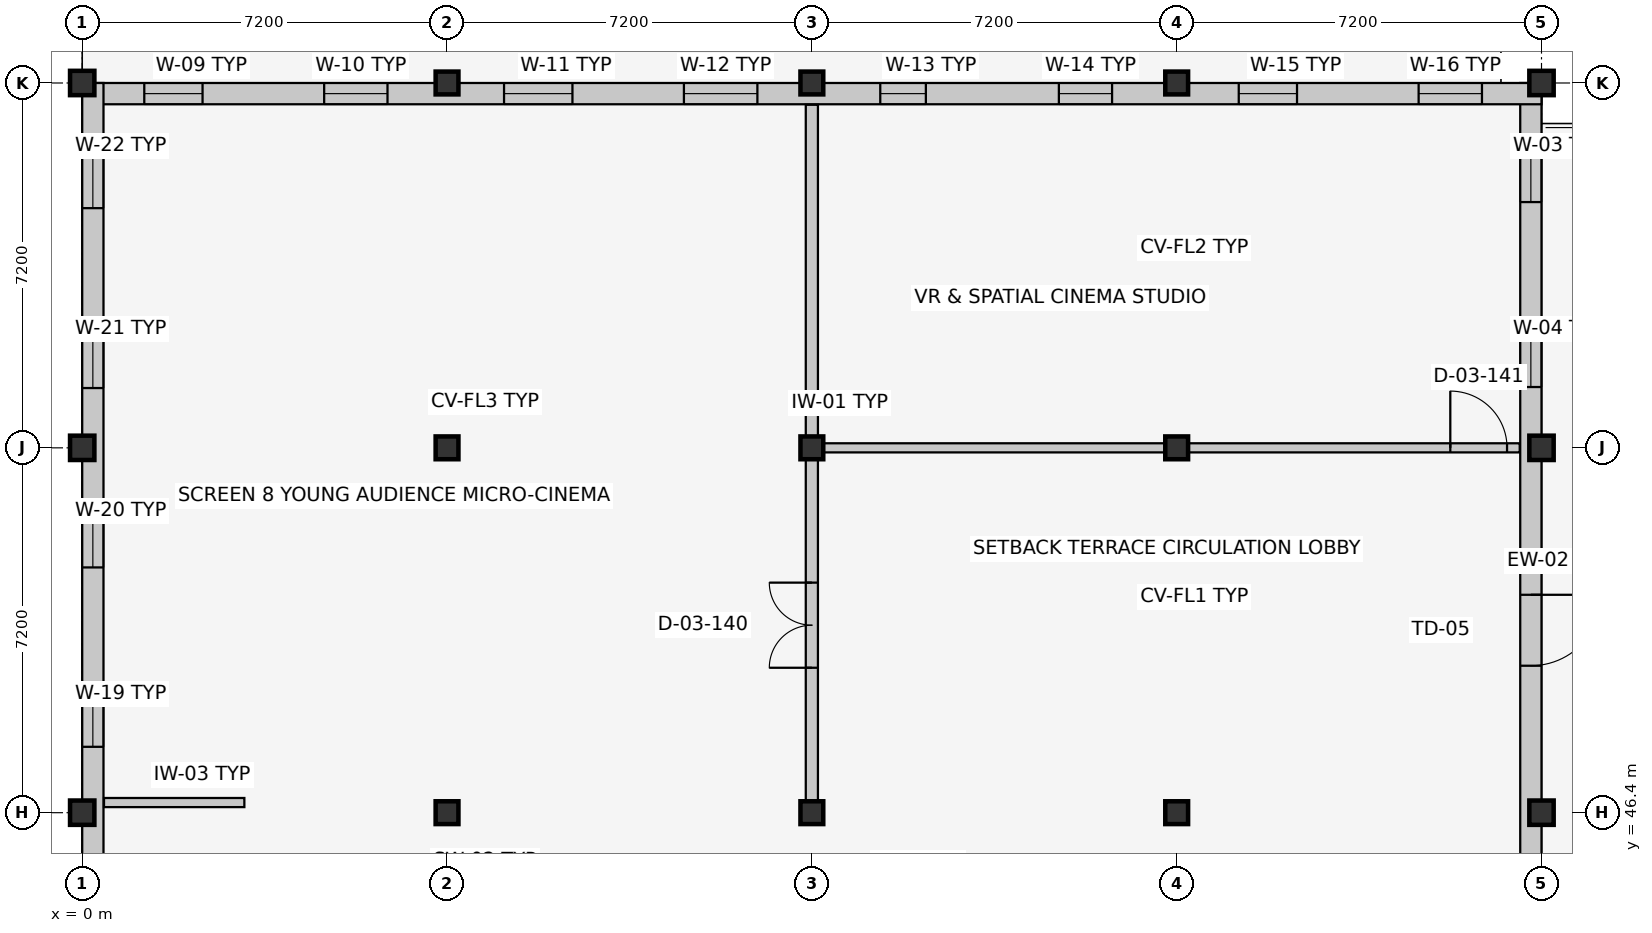
"""IFC4 building model, lengths in metres.
Left out: names, types, materials, properties, quantities, classifications, styles, units other than length and angle.
Written with IfcOpenShell. Run it as: python <this file> out.ifc"""

import sys

from ifc_helpers import new_model, si_unit, direction, frame, frame_2d, origin, origin_2d, place, context, subcontext, project, spatial, rectangle, extrude, element, fill, save


model = new_model("IFC4")
c1 = context("Model", 3, precision=1e-05, world=origin(), true_north=direction((0.0, 1.0)))
c2 = subcontext(c1, "Body", "Model", "MODEL_VIEW")
j1 = project(units=[si_unit("LENGTHUNIT", "METRE"), si_unit("PLANEANGLEUNIT", "RADIAN")], contexts=[c1])
p1 = place(None, origin())
s1 = spatial("IfcSite", under=j1, at=p1, CompositionType="ELEMENT")
p2 = place(p1, origin())
s2 = spatial("IfcBuilding", under=s1, at=p2, CompositionType="ELEMENT")
p3 = place(p2, frame((0.0, 0.0, 13.8)))
s3 = spatial("IfcBuildingStorey", under=s2, at=p3, CompositionType="ELEMENT", Elevation=13.8)
for number, where, z_axis, x_axis in (
    (1, (0.0, 46.4, 0.0), (0.0, 0.0, 1.0), (1.0, 0.0, 0.0)),
    (2, (0.0, 53.6, 0.0), (0.0, 0.0, 1.0), (1.0, 0.0, 0.0)),
    (3, (0.0, 60.8, 0.0), (0.0, 0.0, 1.0), (1.0, 0.0, 0.0)),
):
    element("IfcColumn", number, at=place(p3, frame(where, z_axis=z_axis, x_axis=x_axis)), inside=s3, PredefinedType="COLUMN", context=c2, shape_type="SweptSolid", body=[
        extrude(rectangle(XDim=0.48, YDim=0.48, at=origin_2d()), origin(), (0.0, 0.0, 1.0), 4.2),
    ])
for number, where, z_axis, x_axis in (
    (4, (7.2, 46.4, 0.0), (0.0, 0.0, 1.0), (1.0, 0.0, 0.0)),
    (5, (7.2, 53.6, 0.0), (0.0, 0.0, 1.0), (1.0, 0.0, 0.0)),
    (6, (7.2, 60.8, 0.0), (0.0, 0.0, 1.0), (1.0, 0.0, 0.0)),
    (7, (14.4, 46.4, 0.0), (0.0, 0.0, 1.0), (1.0, 0.0, 0.0)),
    (8, (14.4, 53.6, 0.0), (0.0, 0.0, 1.0), (1.0, 0.0, 0.0)),
    (9, (14.4, 60.8, 0.0), (0.0, 0.0, 1.0), (1.0, 0.0, 0.0)),
    (10, (21.6, 46.4, 0.0), (0.0, 0.0, 1.0), (1.0, 0.0, 0.0)),
    (11, (21.6, 53.6, 0.0), (0.0, 0.0, 1.0), (1.0, 0.0, 0.0)),
    (12, (21.6, 60.8, 0.0), (0.0, 0.0, 1.0), (1.0, 0.0, 0.0)),
):
    element("IfcColumn", number, at=place(p3, frame(where, z_axis=z_axis, x_axis=x_axis)), inside=s3, PredefinedType="COLUMN", context=c2, shape_type="SweptSolid", body=[
        extrude(rectangle(XDim=0.45, YDim=0.45, at=origin_2d()), origin(), (0.0, 0.0, 1.0), 4.2),
    ])
for number, where, z_axis, x_axis in (
    (13, (28.8, 46.4, 0.0), (0.0, 0.0, 1.0), (1.0, 0.0, 0.0)),
    (14, (28.8, 53.6, 0.0), (0.0, 0.0, 1.0), (1.0, 0.0, 0.0)),
    (15, (28.8, 60.8, 0.0), (0.0, 0.0, 1.0), (1.0, 0.0, 0.0)),
):
    element("IfcColumn", number, at=place(p3, frame(where, z_axis=z_axis, x_axis=x_axis)), inside=s3, PredefinedType="COLUMN", context=c2, shape_type="SweptSolid", body=[
        extrude(rectangle(XDim=0.48, YDim=0.48, at=origin_2d()), origin(), (0.0, 0.0, 1.0), 4.2),
    ])
p4 = place(p3, frame((28.59, 60.8, 0.0), z_axis=(0.0, 0.0, 1.0), x_axis=(0.0, -1.0, 0.0)))
e16 = element("IfcWall", 16, at=p4, inside=s3, PredefinedType="SOLIDWALL", context=c2, shape_type="SweptSolid", body=[
    extrude(rectangle(XDim=21.6, YDim=0.42, at=frame_2d((10.8, 0.0))), origin(), (0.0, 0.0, 1.0), 3.205),
])
p5 = place(p4, frame((10.1, 0.0, 0.0)))
e17 = element("IfcOpeningElement", 17, at=p5, cuts=e16, PredefinedType="OPENING", context=c2, shape_type="SweptSolid", body=[
    extrude(rectangle(XDim=1.4, YDim=2.2, at=frame_2d((0.7, 1.1))), frame((0.0, 0.222, 0.0), z_axis=(0.0, -1.0, 0.0), x_axis=(1.0, 0.0, 0.0)), (0.0, 0.0, 1.0), 0.444),
])
p6 = place(p4, frame((1.25, 0.0, 0.9)))
e18 = element("IfcOpeningElement", 18, at=p6, cuts=e16, PredefinedType="OPENING", context=c2, shape_type="SweptSolid", body=[
    extrude(rectangle(XDim=1.1, YDim=1.35, at=frame_2d((0.55, 0.675))), frame((0.0, 0.222, 0.0), z_axis=(0.0, -1.0, 0.0), x_axis=(1.0, 0.0, 0.0)), (0.0, 0.0, 1.0), 0.444),
])
p7 = place(p4, frame((4.8, 0.0, 0.9)))
e19 = element("IfcOpeningElement", 19, at=p7, cuts=e16, PredefinedType="OPENING", context=c2, shape_type="SweptSolid", body=[
    extrude(rectangle(XDim=1.2, YDim=1.35, at=frame_2d((0.6, 0.675))), frame((0.0, 0.222, 0.0), z_axis=(0.0, -1.0, 0.0), x_axis=(1.0, 0.0, 0.0)), (0.0, 0.0, 1.0), 0.444),
])
p8 = place(p4, frame((19.275, 0.0, 0.9)))
e20 = element("IfcOpeningElement", 20, at=p8, cuts=e16, PredefinedType="OPENING", context=c2, shape_type="SweptSolid", body=[
    extrude(rectangle(XDim=1.05, YDim=1.45, at=frame_2d((0.525, 0.725))), frame((0.0, 0.222, 0.0), z_axis=(0.0, -1.0, 0.0), x_axis=(1.0, 0.0, 0.0)), (0.0, 0.0, 1.0), 0.444),
])
p9 = place(p3, frame((0.0, 60.59, 0.0), z_axis=(0.0, 0.0, 1.0), x_axis=(1.0, 0.0, 0.0)))
e21 = element("IfcWall", 21, at=p9, inside=s3, PredefinedType="SOLIDWALL", context=c2, shape_type="SweptSolid", body=[
    extrude(rectangle(XDim=28.8, YDim=0.42, at=frame_2d((14.4, 0.0))), origin(), (0.0, 0.0, 1.0), 3.085),
])
p10 = place(p9, frame((1.225, 0.0, 0.9)))
e22 = element("IfcOpeningElement", 22, at=p10, cuts=e21, PredefinedType="OPENING", context=c2, shape_type="SweptSolid", body=[
    extrude(rectangle(XDim=1.15, YDim=1.45, at=frame_2d((0.575, 0.725))), frame((0.0, 0.222, 0.0), z_axis=(0.0, -1.0, 0.0), x_axis=(1.0, 0.0, 0.0)), (0.0, 0.0, 1.0), 0.444),
])
p11 = place(p9, frame((4.775, 0.0, 0.9)))
e23 = element("IfcOpeningElement", 23, at=p11, cuts=e21, PredefinedType="OPENING", context=c2, shape_type="SweptSolid", body=[
    extrude(rectangle(XDim=1.25, YDim=1.45, at=frame_2d((0.625, 0.725))), frame((0.0, 0.222, 0.0), z_axis=(0.0, -1.0, 0.0), x_axis=(1.0, 0.0, 0.0)), (0.0, 0.0, 1.0), 0.444),
])
p12 = place(p9, frame((8.325, 0.0, 0.9)))
e24 = element("IfcOpeningElement", 24, at=p12, cuts=e21, PredefinedType="OPENING", context=c2, shape_type="SweptSolid", body=[
    extrude(rectangle(XDim=1.35, YDim=1.45, at=frame_2d((0.675, 0.725))), frame((0.0, 0.222, 0.0), z_axis=(0.0, -1.0, 0.0), x_axis=(1.0, 0.0, 0.0)), (0.0, 0.0, 1.0), 0.444),
])
p13 = place(p9, frame((11.875, 0.0, 0.9)))
e25 = element("IfcOpeningElement", 25, at=p13, cuts=e21, PredefinedType="OPENING", context=c2, shape_type="SweptSolid", body=[
    extrude(rectangle(XDim=1.45, YDim=1.45, at=frame_2d((0.725, 0.725))), frame((0.0, 0.222, 0.0), z_axis=(0.0, -1.0, 0.0), x_axis=(1.0, 0.0, 0.0)), (0.0, 0.0, 1.0), 0.444),
])
p14 = place(p9, frame((15.75, 0.0, 0.9)))
e26 = element("IfcOpeningElement", 26, at=p14, cuts=e21, PredefinedType="OPENING", context=c2, shape_type="SweptSolid", body=[
    extrude(rectangle(XDim=0.9, YDim=1.6, at=frame_2d((0.45, 0.8))), frame((0.0, 0.222, 0.0), z_axis=(0.0, -1.0, 0.0), x_axis=(1.0, 0.0, 0.0)), (0.0, 0.0, 1.0), 0.444),
])
p15 = place(p9, frame((19.275, 0.0, 0.9)))
e27 = element("IfcOpeningElement", 27, at=p15, cuts=e21, PredefinedType="OPENING", context=c2, shape_type="SweptSolid", body=[
    extrude(rectangle(XDim=1.05, YDim=1.6, at=frame_2d((0.525, 0.8))), frame((0.0, 0.222, 0.0), z_axis=(0.0, -1.0, 0.0), x_axis=(1.0, 0.0, 0.0)), (0.0, 0.0, 1.0), 0.444),
])
p16 = place(p9, frame((22.825, 0.0, 0.9)))
e28 = element("IfcOpeningElement", 28, at=p16, cuts=e21, PredefinedType="OPENING", context=c2, shape_type="SweptSolid", body=[
    extrude(rectangle(XDim=1.15, YDim=1.6, at=frame_2d((0.575, 0.8))), frame((0.0, 0.222, 0.0), z_axis=(0.0, -1.0, 0.0), x_axis=(1.0, 0.0, 0.0)), (0.0, 0.0, 1.0), 0.444),
])
p17 = place(p9, frame((26.375, 0.0, 0.9)))
e29 = element("IfcOpeningElement", 29, at=p17, cuts=e21, PredefinedType="OPENING", context=c2, shape_type="SweptSolid", body=[
    extrude(rectangle(XDim=1.25, YDim=1.6, at=frame_2d((0.625, 0.8))), frame((0.0, 0.222, 0.0), z_axis=(0.0, -1.0, 0.0), x_axis=(1.0, 0.0, 0.0)), (0.0, 0.0, 1.0), 0.444),
])
p18 = place(p3, frame((0.21, 39.2, 0.0), z_axis=(0.0, 0.0, 1.0), x_axis=(0.0, 1.0, 0.0)))
e30 = element("IfcWall", 30, at=p18, inside=s3, PredefinedType="SOLIDWALL", context=c2, shape_type="SweptSolid", body=[
    extrude(rectangle(XDim=21.6, YDim=0.42, at=frame_2d((10.8, 0.0))), origin(), (0.0, 0.0, 1.0), 3.215),
])
p19 = place(p18, frame((1.11, 0.0, 0.9)))
e31 = element("IfcOpeningElement", 31, at=p19, cuts=e30, PredefinedType="OPENING", context=c2, shape_type="SweptSolid", body=[
    extrude(rectangle(XDim=1.38, YDim=1.6, at=frame_2d((0.69, 0.8))), frame((0.0, 0.222, 0.0), z_axis=(0.0, -1.0, 0.0), x_axis=(1.0, 0.0, 0.0)), (0.0, 0.0, 1.0), 0.444),
])
p20 = place(p18, frame((4.65, 0.0, 0.9)))
e32 = element("IfcOpeningElement", 32, at=p20, cuts=e30, PredefinedType="OPENING", context=c2, shape_type="SweptSolid", body=[
    extrude(rectangle(XDim=1.5, YDim=1.6, at=frame_2d((0.75, 0.8))), frame((0.0, 0.222, 0.0), z_axis=(0.0, -1.0, 0.0), x_axis=(1.0, 0.0, 0.0)), (0.0, 0.0, 1.0), 0.444),
])
p21 = place(p18, frame((8.5, 0.0, 0.9)))
e33 = element("IfcOpeningElement", 33, at=p21, cuts=e30, PredefinedType="OPENING", context=c2, shape_type="SweptSolid", body=[
    extrude(rectangle(XDim=1.0, YDim=1.75, at=frame_2d((0.5, 0.875))), frame((0.0, 0.222, 0.0), z_axis=(0.0, -1.0, 0.0), x_axis=(1.0, 0.0, 0.0)), (0.0, 0.0, 1.0), 0.444),
])
p22 = place(p18, frame((12.04, 0.0, 0.9)))
e34 = element("IfcOpeningElement", 34, at=p22, cuts=e30, PredefinedType="OPENING", context=c2, shape_type="SweptSolid", body=[
    extrude(rectangle(XDim=1.12, YDim=1.75, at=frame_2d((0.56, 0.875))), frame((0.0, 0.222, 0.0), z_axis=(0.0, -1.0, 0.0), x_axis=(1.0, 0.0, 0.0)), (0.0, 0.0, 1.0), 0.444),
])
p23 = place(p18, frame((15.58, 0.0, 0.9)))
e35 = element("IfcOpeningElement", 35, at=p23, cuts=e30, PredefinedType="OPENING", context=c2, shape_type="SweptSolid", body=[
    extrude(rectangle(XDim=1.24, YDim=1.75, at=frame_2d((0.62, 0.875))), frame((0.0, 0.222, 0.0), z_axis=(0.0, -1.0, 0.0), x_axis=(1.0, 0.0, 0.0)), (0.0, 0.0, 1.0), 0.444),
])
p24 = place(p18, frame((19.13, 0.0, 0.9)))
e36 = element("IfcOpeningElement", 36, at=p24, cuts=e30, PredefinedType="OPENING", context=c2, shape_type="SweptSolid", body=[
    extrude(rectangle(XDim=1.34, YDim=1.75, at=frame_2d((0.67, 0.875))), frame((0.0, 0.222, 0.0), z_axis=(0.0, -1.0, 0.0), x_axis=(1.0, 0.0, 0.0)), (0.0, 0.0, 1.0), 0.444),
])
p25 = place(p3, frame((0.43, 46.6, 0.0), z_axis=(0.0, 0.0, 1.0), x_axis=(1.0, 0.0, 0.0)))
e37 = element("IfcWall", 37, at=p25, inside=s3, PredefinedType="PARTITIONING", context=c2, shape_type="SweptSolid", body=[
    extrude(rectangle(XDim=2.77, YDim=0.18, at=frame_2d((1.385, 0.0))), origin(), (0.0, 0.0, 1.0), 3.185),
])
p26 = place(p3, frame((14.4, 46.6, 0.0), z_axis=(0.0, 0.0, 1.0), x_axis=(0.0, 1.0, 0.0)))
e38 = element("IfcWall", 38, at=p26, inside=s3, PredefinedType="PARTITIONING", context=c2, shape_type="SweptSolid", body=[
    extrude(rectangle(XDim=13.77, YDim=0.24, at=frame_2d((6.885, 0.0))), origin(), (0.0, 0.0, 1.0), 3.335),
])
p27 = place(p26, frame((2.66, 0.0, 0.0)))
e39 = element("IfcOpeningElement", 39, at=p27, cuts=e38, PredefinedType="OPENING", context=c2, shape_type="SweptSolid", body=[
    extrude(rectangle(XDim=1.68, YDim=2.3, at=frame_2d((0.84, 1.15))), frame((0.0, 0.132, 0.0), z_axis=(0.0, -1.0, 0.0), x_axis=(1.0, 0.0, 0.0)), (0.0, 0.0, 1.0), 0.264),
])
p28 = place(p3, frame((14.53, 53.6, 0.0), z_axis=(0.0, 0.0, 1.0), x_axis=(1.0, 0.0, 0.0)))
e40 = element("IfcWall", 40, at=p28, inside=s3, PredefinedType="PARTITIONING", context=c2, shape_type="SweptSolid", body=[
    extrude(rectangle(XDim=13.84, YDim=0.18, at=frame_2d((6.92, 0.0))), origin(), (0.0, 0.0, 1.0), 3.085),
])
p29 = place(p28, frame((12.47, 0.0, 0.0)))
e41 = element("IfcOpeningElement", 41, at=p29, cuts=e40, PredefinedType="OPENING", context=c2, shape_type="SweptSolid", body=[
    extrude(rectangle(XDim=1.12, YDim=2.15, at=frame_2d((0.56, 1.075))), frame((0.0, 0.102, 0.0), z_axis=(0.0, -1.0, 0.0), x_axis=(1.0, 0.0, 0.0)), (0.0, 0.0, 1.0), 0.204),
])
p30 = place(p5, origin())
e42 = element("IfcDoor", 42, at=p30, inside=s3, OperationType="SINGLE_SWING_LEFT", PredefinedType="DOOR", context=c2, shape_type="SweptSolid", body=[
    extrude(rectangle(XDim=1.4, YDim=2.2, at=frame_2d((0.7, 1.1))), frame((0.0, 0.025, 0.0), z_axis=(0.0, -1.0, 0.0), x_axis=(1.0, 0.0, 0.0)), (0.0, 0.0, 1.0), 0.05),
])
fill(e17, e42)
p31 = place(p6, origin())
e43 = element("IfcWindow", 43, at=p31, inside=s3, PartitioningType="SINGLE_PANEL", PredefinedType="WINDOW", context=c2, shape_type="SweptSolid", body=[
    extrude(rectangle(XDim=1.1, YDim=1.35, at=frame_2d((0.55, 0.675))), frame((0.0, 0.03, 0.0), z_axis=(0.0, -1.0, 0.0), x_axis=(1.0, 0.0, 0.0)), (0.0, 0.0, 1.0), 0.06),
])
fill(e18, e43)
p32 = place(p7, origin())
e44 = element("IfcWindow", 44, at=p32, inside=s3, PartitioningType="SINGLE_PANEL", PredefinedType="WINDOW", context=c2, shape_type="SweptSolid", body=[
    extrude(rectangle(XDim=1.2, YDim=1.35, at=frame_2d((0.6, 0.675))), frame((0.0, 0.03, 0.0), z_axis=(0.0, -1.0, 0.0), x_axis=(1.0, 0.0, 0.0)), (0.0, 0.0, 1.0), 0.06),
])
fill(e19, e44)
p33 = place(p10, origin())
e45 = element("IfcWindow", 45, at=p33, inside=s3, PartitioningType="SINGLE_PANEL", PredefinedType="WINDOW", context=c2, shape_type="SweptSolid", body=[
    extrude(rectangle(XDim=1.15, YDim=1.45, at=frame_2d((0.575, 0.725))), frame((0.0, 0.03, 0.0), z_axis=(0.0, -1.0, 0.0), x_axis=(1.0, 0.0, 0.0)), (0.0, 0.0, 1.0), 0.06),
])
fill(e22, e45)
p34 = place(p11, origin())
e46 = element("IfcWindow", 46, at=p34, inside=s3, PartitioningType="SINGLE_PANEL", PredefinedType="WINDOW", context=c2, shape_type="SweptSolid", body=[
    extrude(rectangle(XDim=1.25, YDim=1.45, at=frame_2d((0.625, 0.725))), frame((0.0, 0.03, 0.0), z_axis=(0.0, -1.0, 0.0), x_axis=(1.0, 0.0, 0.0)), (0.0, 0.0, 1.0), 0.06),
])
fill(e23, e46)
p35 = place(p12, origin())
e47 = element("IfcWindow", 47, at=p35, inside=s3, PartitioningType="SINGLE_PANEL", PredefinedType="WINDOW", context=c2, shape_type="SweptSolid", body=[
    extrude(rectangle(XDim=1.35, YDim=1.45, at=frame_2d((0.675, 0.725))), frame((0.0, 0.03, 0.0), z_axis=(0.0, -1.0, 0.0), x_axis=(1.0, 0.0, 0.0)), (0.0, 0.0, 1.0), 0.06),
])
fill(e24, e47)
p36 = place(p13, origin())
e48 = element("IfcWindow", 48, at=p36, inside=s3, PartitioningType="SINGLE_PANEL", PredefinedType="WINDOW", context=c2, shape_type="SweptSolid", body=[
    extrude(rectangle(XDim=1.45, YDim=1.45, at=frame_2d((0.725, 0.725))), frame((0.0, 0.03, 0.0), z_axis=(0.0, -1.0, 0.0), x_axis=(1.0, 0.0, 0.0)), (0.0, 0.0, 1.0), 0.06),
])
fill(e25, e48)
p37 = place(p14, origin())
e49 = element("IfcWindow", 49, at=p37, inside=s3, PartitioningType="SINGLE_PANEL", PredefinedType="WINDOW", context=c2, shape_type="SweptSolid", body=[
    extrude(rectangle(XDim=0.9, YDim=1.6, at=frame_2d((0.45, 0.8))), frame((0.0, 0.03, 0.0), z_axis=(0.0, -1.0, 0.0), x_axis=(1.0, 0.0, 0.0)), (0.0, 0.0, 1.0), 0.06),
])
fill(e26, e49)
p38 = place(p15, origin())
e50 = element("IfcWindow", 50, at=p38, inside=s3, PartitioningType="SINGLE_PANEL", PredefinedType="WINDOW", context=c2, shape_type="SweptSolid", body=[
    extrude(rectangle(XDim=1.05, YDim=1.6, at=frame_2d((0.525, 0.8))), frame((0.0, 0.03, 0.0), z_axis=(0.0, -1.0, 0.0), x_axis=(1.0, 0.0, 0.0)), (0.0, 0.0, 1.0), 0.06),
])
fill(e27, e50)
p39 = place(p16, origin())
e51 = element("IfcWindow", 51, at=p39, inside=s3, PartitioningType="SINGLE_PANEL", PredefinedType="WINDOW", context=c2, shape_type="SweptSolid", body=[
    extrude(rectangle(XDim=1.15, YDim=1.6, at=frame_2d((0.575, 0.8))), frame((0.0, 0.03, 0.0), z_axis=(0.0, -1.0, 0.0), x_axis=(1.0, 0.0, 0.0)), (0.0, 0.0, 1.0), 0.06),
])
fill(e28, e51)
p40 = place(p17, origin())
e52 = element("IfcWindow", 52, at=p40, inside=s3, PartitioningType="SINGLE_PANEL", PredefinedType="WINDOW", context=c2, shape_type="SweptSolid", body=[
    extrude(rectangle(XDim=1.25, YDim=1.6, at=frame_2d((0.625, 0.8))), frame((0.0, 0.03, 0.0), z_axis=(0.0, -1.0, 0.0), x_axis=(1.0, 0.0, 0.0)), (0.0, 0.0, 1.0), 0.06),
])
fill(e29, e52)
p41 = place(p21, origin())
e53 = element("IfcWindow", 53, at=p41, inside=s3, PartitioningType="SINGLE_PANEL", PredefinedType="WINDOW", context=c2, shape_type="SweptSolid", body=[
    extrude(rectangle(XDim=1.0, YDim=1.75, at=frame_2d((0.5, 0.875))), frame((0.0, 0.03, 0.0), z_axis=(0.0, -1.0, 0.0), x_axis=(1.0, 0.0, 0.0)), (0.0, 0.0, 1.0), 0.06),
])
fill(e33, e53)
p42 = place(p22, origin())
e54 = element("IfcWindow", 54, at=p42, inside=s3, PartitioningType="SINGLE_PANEL", PredefinedType="WINDOW", context=c2, shape_type="SweptSolid", body=[
    extrude(rectangle(XDim=1.12, YDim=1.75, at=frame_2d((0.56, 0.875))), frame((0.0, 0.03, 0.0), z_axis=(0.0, -1.0, 0.0), x_axis=(1.0, 0.0, 0.0)), (0.0, 0.0, 1.0), 0.06),
])
fill(e34, e54)
p43 = place(p23, origin())
e55 = element("IfcWindow", 55, at=p43, inside=s3, PartitioningType="SINGLE_PANEL", PredefinedType="WINDOW", context=c2, shape_type="SweptSolid", body=[
    extrude(rectangle(XDim=1.24, YDim=1.75, at=frame_2d((0.62, 0.875))), frame((0.0, 0.03, 0.0), z_axis=(0.0, -1.0, 0.0), x_axis=(1.0, 0.0, 0.0)), (0.0, 0.0, 1.0), 0.06),
])
fill(e35, e55)
p44 = place(p24, origin())
e56 = element("IfcWindow", 56, at=p44, inside=s3, PartitioningType="SINGLE_PANEL", PredefinedType="WINDOW", context=c2, shape_type="SweptSolid", body=[
    extrude(rectangle(XDim=1.34, YDim=1.75, at=frame_2d((0.67, 0.875))), frame((0.0, 0.03, 0.0), z_axis=(0.0, -1.0, 0.0), x_axis=(1.0, 0.0, 0.0)), (0.0, 0.0, 1.0), 0.06),
])
fill(e36, e56)
p45 = place(p27, origin())
e57 = element("IfcDoor", 57, at=p45, inside=s3, OperationType="DOUBLE_DOOR_SINGLE_SWING", PredefinedType="DOOR", context=c2, shape_type="SweptSolid", body=[
    extrude(rectangle(XDim=1.68, YDim=2.3, at=frame_2d((0.84, 1.15))), frame((0.0, 0.025, 0.0), z_axis=(0.0, -1.0, 0.0), x_axis=(1.0, 0.0, 0.0)), (0.0, 0.0, 1.0), 0.05),
])
fill(e39, e57)
p46 = place(p29, origin())
e58 = element("IfcDoor", 58, at=p46, inside=s3, OperationType="SINGLE_SWING_LEFT", PredefinedType="DOOR", context=c2, shape_type="SweptSolid", body=[
    extrude(rectangle(XDim=1.12, YDim=2.15, at=frame_2d((0.56, 1.075))), frame((0.0, 0.025, 0.0), z_axis=(0.0, -1.0, 0.0), x_axis=(1.0, 0.0, 0.0)), (0.0, 0.0, 1.0), 0.05),
])
fill(e41, e58)
save(model, sys.argv[1])
